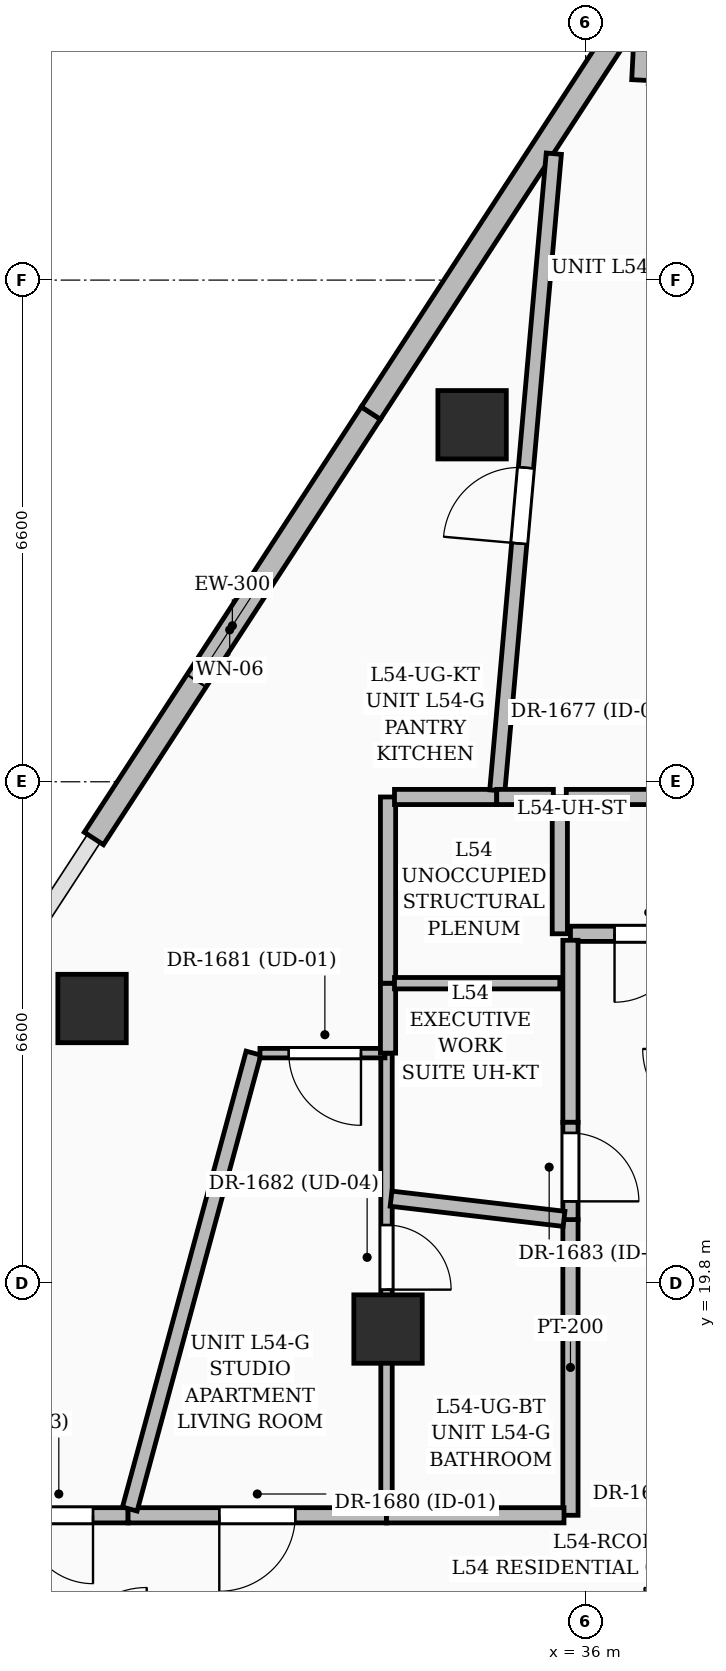
"""IFC4 building model, lengths in metres.
Left out: names, types, materials, properties, quantities, classifications, styles, units other than length and angle.
Written with IfcOpenShell. Run it as: python <this file> out.ifc"""

import sys

from ifc_helpers import new_model, si_unit, direction, frame, frame_2d, origin, origin_2d, place, context, subcontext, project, spatial, rectangle, extrude, element, fill, save


model = new_model("IFC4")
c1 = context("Model", 3, precision=1e-05, world=origin(), true_north=direction((0.0, 1.0)))
c2 = subcontext(c1, "Body", "Model", "MODEL_VIEW")
j1 = project(units=[si_unit("LENGTHUNIT", "METRE"), si_unit("PLANEANGLEUNIT", "RADIAN")], contexts=[c1])
p1 = place(None, origin())
s1 = spatial("IfcSite", under=j1, at=p1, CompositionType="ELEMENT")
p2 = place(p1, origin())
s2 = spatial("IfcBuilding", under=s1, at=p2, CompositionType="ELEMENT")
p3 = place(p2, frame((0.0, 0.0, 210.75)))
s3 = spatial("IfcBuildingStorey", under=s2, at=p3, CompositionType="ELEMENT", Elevation=210.75)
for number, where, z_axis, x_axis in (
    (1, (33.4, 19.2, 0.0), (0.0, 0.0, 1.0), (1.0, 0.0, 0.0)),
    (2, (34.506, 31.097, 0.0), (0.0, 0.0, 1.0), (1.0, 0.0, 0.0)),
    (3, (29.506, 23.417, 0.0), (0.0, 0.0, 1.0), (1.0, 0.0, 0.0)),
):
    element("IfcColumn", number, at=place(p3, frame(where, z_axis=z_axis, x_axis=x_axis)), inside=s3, PredefinedType="COLUMN", context=c2, shape_type="SweptSolid", body=[
        extrude(rectangle(XDim=0.9, YDim=0.9, at=origin_2d()), origin(), (0.0, 0.0, 1.0), 3.75),
    ])
p4 = place(p3, frame((29.53, 25.654, 0.0), z_axis=(0.0, 0.0, 1.0), x_axis=(0.545624217243, 0.838029959821, 0.0)))
e4 = element("IfcWall", 4, at=p4, inside=s3, PredefinedType="SOLIDWALL", context=c2, shape_type="SweptSolid", body=[
    extrude(rectangle(XDim=6.679, YDim=0.3, at=frame_2d((3.339, 0.0))), origin(), (0.0, 0.0, 1.0), 3.5),
])
p5 = place(p4, frame((2.475, 0.0, 0.55)))
e5 = element("IfcOpeningElement", 5, at=p5, cuts=e4, PredefinedType="OPENING", context=c2, shape_type="SweptSolid", body=[
    extrude(rectangle(XDim=1.6, YDim=2.2, at=frame_2d((0.8, 1.1))), frame((0.0, 0.16, 0.0), z_axis=(0.0, -1.0, 0.0), x_axis=(1.0, 0.0, 0.0)), (0.0, 0.0, 1.0), 0.32),
])
p6 = place(p3, frame((33.174, 31.251, 0.0), z_axis=(0.0, 0.0, 1.0), x_axis=(0.545624217243, 0.838029959821, 0.0)))
e6 = element("IfcWall", 6, at=p6, inside=s3, PredefinedType="SOLIDWALL", context=c2, shape_type="SweptSolid", body=[
    extrude(rectangle(XDim=6.679, YDim=0.3, at=frame_2d((3.339, 0.0))), origin(), (0.0, 0.0, 1.0), 3.5),
])
p7 = place(p3, frame((36.795, 36.394, 0.0), z_axis=(0.0, 0.0, 1.0), x_axis=(-0.051035290984, -0.998696850438, 0.0)))
e7 = element("IfcWall", 7, at=p7, inside=s3, PredefinedType="SOLIDWALL", context=c2, shape_type="SweptSolid", body=[
    extrude(rectangle(XDim=0.765, YDim=0.3, at=frame_2d((0.383, 0.0))), origin(), (0.0, 0.0, 1.0), 3.5),
])
p8 = place(p3, frame((29.98, 16.75, 0.0), z_axis=(0.0, 0.0, 1.0), x_axis=(-1.0, 0.0, 0.0)))
e8 = element("IfcWall", 8, at=p8, inside=s3, PredefinedType="PARTITIONING", context=c2, shape_type="SweptSolid", body=[
    extrude(rectangle(XDim=1.845, YDim=0.2, at=frame_2d((0.922, 0.0))), origin(), (0.0, 0.0, 1.0), 3.5),
])
p9 = place(p8, frame((0.461, 0.0, 0.0)))
e9 = element("IfcOpeningElement", 9, at=p9, cuts=e8, PredefinedType="OPENING", context=c2, shape_type="SweptSolid", body=[
    extrude(rectangle(XDim=0.9, YDim=2.1, at=frame_2d((0.45, 1.05))), frame((0.0, 0.11, 0.0), z_axis=(0.0, -1.0, 0.0), x_axis=(1.0, 0.0, 0.0)), (0.0, 0.0, 1.0), 0.22),
])
p10 = place(p3, frame((33.38, 16.75, 0.0), z_axis=(0.0, 0.0, 1.0), x_axis=(-1.0, 0.0, 0.0)))
e10 = element("IfcWall", 10, at=p10, inside=s3, PredefinedType="PARTITIONING", context=c2, shape_type="SweptSolid", body=[
    extrude(rectangle(XDim=3.4, YDim=0.2, at=frame_2d((1.7, 0.0))), origin(), (0.0, 0.0, 1.0), 3.5),
])
p11 = place(p10, frame((1.2, 0.0, 0.0)))
e11 = element("IfcOpeningElement", 11, at=p11, cuts=e10, PredefinedType="OPENING", context=c2, shape_type="SweptSolid", body=[
    extrude(rectangle(XDim=1.0, YDim=2.2, at=frame_2d((0.5, 1.1))), frame((0.0, 0.11, 0.0), z_axis=(0.0, -1.0, 0.0), x_axis=(1.0, 0.0, 0.0)), (0.0, 0.0, 1.0), 0.22),
])
p12 = place(p3, frame((35.8, 20.64, 0.0), z_axis=(0.0, 0.0, 1.0), x_axis=(0.0, -1.0, 0.0)))
e12 = element("IfcWall", 12, at=p12, inside=s3, PredefinedType="PARTITIONING", context=c2, shape_type="SweptSolid", body=[
    extrude(rectangle(XDim=3.89, YDim=0.2, at=frame_2d((1.945, 0.0))), origin(), (0.0, 0.0, 1.0), 3.5),
])
p13 = place(p3, frame((35.715, 16.75, 0.0), z_axis=(0.0, 0.0, 1.0), x_axis=(-1.0, 0.0, 0.0)))
e13 = element("IfcWall", 13, at=p13, inside=s3, PredefinedType="PARTITIONING", context=c2, shape_type="SweptSolid", body=[
    extrude(rectangle(XDim=2.335, YDim=0.2, at=frame_2d((1.167, 0.0))), origin(), (0.0, 0.0, 1.0), 2.685),
])
p14 = place(p3, frame((37.705, 24.4, 0.0), z_axis=(0.0, 0.0, 1.0), x_axis=(-1.0, 0.0, 0.0)))
e14 = element("IfcWall", 14, at=p14, inside=s3, PredefinedType="PARTITIONING", context=c2, shape_type="SweptSolid", body=[
    extrude(rectangle(XDim=1.905, YDim=0.2, at=frame_2d((0.953, 0.0))), origin(), (0.0, 0.0, 1.0), 2.685),
])
p15 = place(p14, frame((0.425, 0.0, 0.0)))
e15 = element("IfcOpeningElement", 15, at=p15, cuts=e14, PredefinedType="OPENING", context=c2, shape_type="SweptSolid", body=[
    extrude(rectangle(XDim=0.9, YDim=2.1, at=frame_2d((0.45, 1.05))), frame((0.0, 0.11, 0.0), z_axis=(0.0, -1.0, 0.0), x_axis=(1.0, 0.0, 0.0)), (0.0, 0.0, 1.0), 0.22),
])
p16 = place(p3, frame((35.8, 24.315, 0.0), z_axis=(0.0, 0.0, 1.0), x_axis=(0.0, -1.0, 0.0)))
e16 = element("IfcWall", 16, at=p16, inside=s3, PredefinedType="PARTITIONING", context=c2, shape_type="SweptSolid", body=[
    extrude(rectangle(XDim=2.395, YDim=0.2, at=frame_2d((1.198, 0.0))), origin(), (0.0, 0.0, 1.0), 2.685),
])
p17 = place(p3, frame((35.8, 21.92, 0.0), z_axis=(0.0, 0.0, 1.0), x_axis=(0.0, -1.0, 0.0)))
e17 = element("IfcWall", 17, at=p17, inside=s3, PredefinedType="PARTITIONING", context=c2, shape_type="SweptSolid", body=[
    extrude(rectangle(XDim=1.28, YDim=0.2, at=frame_2d((0.64, 0.0))), origin(), (0.0, 0.0, 1.0), 3.5),
])
p18 = place(p17, frame((0.14, 0.0, 0.0)))
e18 = element("IfcOpeningElement", 18, at=p18, cuts=e17, PredefinedType="OPENING", context=c2, shape_type="SweptSolid", body=[
    extrude(rectangle(XDim=0.9, YDim=2.1, at=frame_2d((0.45, 1.05))), frame((0.0, 0.11, 0.0), z_axis=(0.0, -1.0, 0.0), x_axis=(1.0, 0.0, 0.0)), (0.0, 0.0, 1.0), 0.22),
])
p19 = place(p3, frame((30.002, 16.832, 0.0), z_axis=(0.0, 0.0, 1.0), x_axis=(0.261897318596, 0.965095743702, 0.0)))
e19 = element("IfcWall", 19, at=p19, inside=s3, PredefinedType="PARTITIONING", context=c2, shape_type="SweptSolid", body=[
    extrude(rectangle(XDim=6.215, YDim=0.2, at=frame_2d((3.107, 0.0))), origin(), (0.0, 0.0, 1.0), 2.685),
])
p20 = place(p3, frame((33.38, 22.83, 0.0), z_axis=(0.0, 0.0, 1.0), x_axis=(0.0, -1.0, 0.0)))
e20 = element("IfcWall", 20, at=p20, inside=s3, PredefinedType="PARTITIONING", context=c2, shape_type="SweptSolid", body=[
    extrude(rectangle(XDim=5.995, YDim=0.15, at=frame_2d((2.998, 0.0))), origin(), (0.0, 0.0, 1.0), 2.685),
])
p21 = place(p20, frame((2.261, 0.0, 0.0)))
e21 = element("IfcOpeningElement", 21, at=p21, cuts=e20, PredefinedType="OPENING", context=c2, shape_type="SweptSolid", body=[
    extrude(rectangle(XDim=0.85, YDim=2.1, at=frame_2d((0.425, 1.05))), frame((0.0, 0.085, 0.0), z_axis=(0.0, -1.0, 0.0), x_axis=(1.0, 0.0, 0.0)), (0.0, 0.0, 1.0), 0.17),
])
p22 = place(p3, frame((33.36, 22.83, 0.0), z_axis=(0.0, 0.0, 1.0), x_axis=(-1.0, 0.0, 0.0)))
e22 = element("IfcWall", 22, at=p22, inside=s3, PredefinedType="PARTITIONING", context=c2, shape_type="SweptSolid", body=[
    extrude(rectangle(XDim=1.645, YDim=0.125, at=frame_2d((0.823, 0.0))), origin(), (0.0, 0.0, 1.0), 3.5),
])
p23 = place(p22, frame((0.316, 0.0, 0.0)))
e23 = element("IfcOpeningElement", 23, at=p23, cuts=e22, PredefinedType="OPENING", context=c2, shape_type="SweptSolid", body=[
    extrude(rectangle(XDim=0.95, YDim=2.2, at=frame_2d((0.475, 1.1))), frame((0.0, 0.072, 0.0), z_axis=(0.0, -1.0, 0.0), x_axis=(1.0, 0.0, 0.0)), (0.0, 0.0, 1.0), 0.145),
])
p24 = place(p3, frame((35.716, 20.65, 0.0), z_axis=(0.0, 0.0, 1.0), x_axis=(-0.993270086926, 0.11582113114, 0.0)))
e24 = element("IfcWall", 24, at=p24, inside=s3, PredefinedType="PARTITIONING", context=c2, shape_type="SweptSolid", body=[
    extrude(rectangle(XDim=2.291, YDim=0.2, at=frame_2d((1.146, 0.0))), origin(), (0.0, 0.0, 1.0), 2.685),
])
p25 = place(p3, frame((33.4, 22.83, 0.0), z_axis=(0.0, 0.0, 1.0), x_axis=(0.0, 1.0, 0.0)))
e25 = element("IfcWall", 25, at=p25, inside=s3, PredefinedType="PARTITIONING", context=c2, shape_type="SweptSolid", body=[
    extrude(rectangle(XDim=0.92, YDim=0.2, at=frame_2d((0.46, 0.0))), origin(), (0.0, 0.0, 1.0), 3.5),
])
p26 = place(p3, frame((33.4, 23.75, 0.0), z_axis=(0.0, 0.0, 1.0), x_axis=(0.0, 1.0, 0.0)))
e26 = element("IfcWall", 26, at=p26, inside=s3, PredefinedType="PARTITIONING", context=c2, shape_type="SweptSolid", body=[
    extrude(rectangle(XDim=2.45, YDim=0.2, at=frame_2d((1.225, 0.0))), origin(), (0.0, 0.0, 1.0), 3.16),
])
p27 = place(p3, frame((33.485, 26.2, 0.0), z_axis=(0.0, 0.0, 1.0), x_axis=(1.0, 0.0, 0.0)))
e27 = element("IfcWall", 27, at=p27, inside=s3, PredefinedType="PARTITIONING", context=c2, shape_type="SweptSolid", body=[
    extrude(rectangle(XDim=1.345, YDim=0.2, at=frame_2d((0.672, 0.0))), origin(), (0.0, 0.0, 1.0), 3.16),
])
p28 = place(p3, frame((34.838, 26.285, 0.0), z_axis=(0.0, 0.0, 1.0), x_axis=(0.088352923437, 0.996089233412, 0.0)))
e28 = element("IfcWall", 28, at=p28, inside=s3, PredefinedType="PARTITIONING", context=c2, shape_type="SweptSolid", body=[
    extrude(rectangle(XDim=8.411, YDim=0.2, at=frame_2d((4.206, 0.0))), origin(), (0.0, 0.0, 1.0), 2.685),
])
p29 = place(p28, frame((3.264, 0.0, 0.0)))
e29 = element("IfcOpeningElement", 29, at=p29, cuts=e28, PredefinedType="OPENING", context=c2, shape_type="SweptSolid", body=[
    extrude(rectangle(XDim=1.0, YDim=2.2, at=frame_2d((0.5, 1.1))), frame((0.0, 0.11, 0.0), z_axis=(0.0, -1.0, 0.0), x_axis=(1.0, 0.0, 0.0)), (0.0, 0.0, 1.0), 0.22),
])
p30 = place(p3, frame((35.66, 26.2, 0.0), z_axis=(0.0, 0.0, 1.0), x_axis=(0.0, -1.0, 0.0)))
e30 = element("IfcWall", 30, at=p30, inside=s3, PredefinedType="PARTITIONING", context=c2, shape_type="SweptSolid", body=[
    extrude(rectangle(XDim=1.8, YDim=0.2, at=frame_2d((0.9, 0.0))), origin(), (0.0, 0.0, 1.0), 3.16),
])
p31 = place(p3, frame((37.665, 26.2, 0.0), z_axis=(0.0, 0.0, 1.0), x_axis=(-1.0, 0.0, 0.0)))
e31 = element("IfcWall", 31, at=p31, inside=s3, PredefinedType="PARTITIONING", context=c2, shape_type="SweptSolid", body=[
    extrude(rectangle(XDim=1.92, YDim=0.2, at=frame_2d((0.96, 0.0))), origin(), (0.0, 0.0, 1.0), 3.16),
])
p32 = place(p3, frame((35.66, 23.75, 0.0), z_axis=(0.0, 0.0, 1.0), x_axis=(-1.0, 0.0, 0.0)))
e32 = element("IfcWall", 32, at=p32, inside=s3, PredefinedType="PARTITIONING", context=c2, shape_type="SweptSolid", body=[
    extrude(rectangle(XDim=2.175, YDim=0.15, at=frame_2d((1.087, 0.0))), origin(), (0.0, 0.0, 1.0), 3.16),
])
p33 = place(p3, frame((35.575, 26.2, 0.0), z_axis=(0.0, 0.0, 1.0), x_axis=(-1.0, 0.0, 0.0)))
e33 = element("IfcWall", 33, at=p33, inside=s3, PredefinedType="PARTITIONING", context=c2, shape_type="SweptSolid", body=[
    extrude(rectangle(XDim=0.745, YDim=0.2, at=frame_2d((0.373, 0.0))), origin(), (0.0, 0.0, 1.0), 3.16),
])
p34 = place(p5, origin())
e34 = element("IfcWindow", 34, at=p34, inside=s3, PartitioningType="SINGLE_PANEL", PredefinedType="WINDOW", context=c2, shape_type="SweptSolid", body=[
    extrude(rectangle(XDim=1.6, YDim=2.2, at=frame_2d((0.8, 1.1))), frame((0.0, 0.03, 0.0), z_axis=(0.0, -1.0, 0.0), x_axis=(1.0, 0.0, 0.0)), (0.0, 0.0, 1.0), 0.06),
])
fill(e5, e34)
p35 = place(p9, origin())
e35 = element("IfcDoor", 35, at=p35, inside=s3, OperationType="SINGLE_SWING_LEFT", PredefinedType="DOOR", context=c2, shape_type="SweptSolid", body=[
    extrude(rectangle(XDim=0.9, YDim=2.1, at=frame_2d((0.45, 1.05))), frame((0.0, 0.025, 0.0), z_axis=(0.0, -1.0, 0.0), x_axis=(1.0, 0.0, 0.0)), (0.0, 0.0, 1.0), 0.05),
])
fill(e9, e35)
p36 = place(p15, origin())
e36 = element("IfcDoor", 36, at=p36, inside=s3, OperationType="SINGLE_SWING_RIGHT", PredefinedType="DOOR", context=c2, shape_type="SweptSolid", body=[
    extrude(rectangle(XDim=0.9, YDim=2.1, at=frame_2d((0.45, 1.05))), frame((0.0, 0.025, 0.0), z_axis=(0.0, -1.0, 0.0), x_axis=(1.0, 0.0, 0.0)), (0.0, 0.0, 1.0), 0.05),
])
fill(e15, e36)
p37 = place(p11, origin())
e37 = element("IfcDoor", 37, at=p37, inside=s3, OperationType="SINGLE_SWING_RIGHT", PredefinedType="DOOR", context=c2, shape_type="SweptSolid", body=[
    extrude(rectangle(XDim=1.0, YDim=2.2, at=frame_2d((0.5, 1.1))), frame((0.0, 0.025, 0.0), z_axis=(0.0, -1.0, 0.0), x_axis=(1.0, 0.0, 0.0)), (0.0, 0.0, 1.0), 0.05),
])
fill(e11, e37)
p38 = place(p23, origin())
e38 = element("IfcDoor", 38, at=p38, inside=s3, OperationType="SINGLE_SWING_LEFT", PredefinedType="DOOR", context=c2, shape_type="SweptSolid", body=[
    extrude(rectangle(XDim=0.95, YDim=2.2, at=frame_2d((0.475, 1.1))), frame((0.0, 0.025, 0.0), z_axis=(0.0, -1.0, 0.0), x_axis=(1.0, 0.0, 0.0)), (0.0, 0.0, 1.0), 0.05),
])
fill(e23, e38)
p39 = place(p21, origin())
e39 = element("IfcDoor", 39, at=p39, inside=s3, OperationType="SINGLE_SWING_RIGHT", PredefinedType="DOOR", context=c2, shape_type="SweptSolid", body=[
    extrude(rectangle(XDim=0.85, YDim=2.1, at=frame_2d((0.425, 1.05))), frame((0.0, 0.025, 0.0), z_axis=(0.0, -1.0, 0.0), x_axis=(1.0, 0.0, 0.0)), (0.0, 0.0, 1.0), 0.05),
])
fill(e21, e39)
p40 = place(p18, origin())
e40 = element("IfcDoor", 40, at=p40, inside=s3, OperationType="SINGLE_SWING_RIGHT", PredefinedType="DOOR", context=c2, shape_type="SweptSolid", body=[
    extrude(rectangle(XDim=0.9, YDim=2.1, at=frame_2d((0.45, 1.05))), frame((0.0, 0.025, 0.0), z_axis=(0.0, -1.0, 0.0), x_axis=(1.0, 0.0, 0.0)), (0.0, 0.0, 1.0), 0.05),
])
fill(e18, e40)
p41 = place(p29, origin())
e41 = element("IfcDoor", 41, at=p41, inside=s3, OperationType="SINGLE_SWING_LEFT", PredefinedType="DOOR", context=c2, shape_type="SweptSolid", body=[
    extrude(rectangle(XDim=1.0, YDim=2.2, at=frame_2d((0.5, 1.1))), frame((0.0, 0.025, 0.0), z_axis=(0.0, -1.0, 0.0), x_axis=(1.0, 0.0, 0.0)), (0.0, 0.0, 1.0), 0.05),
])
fill(e29, e41)
save(model, sys.argv[1])
